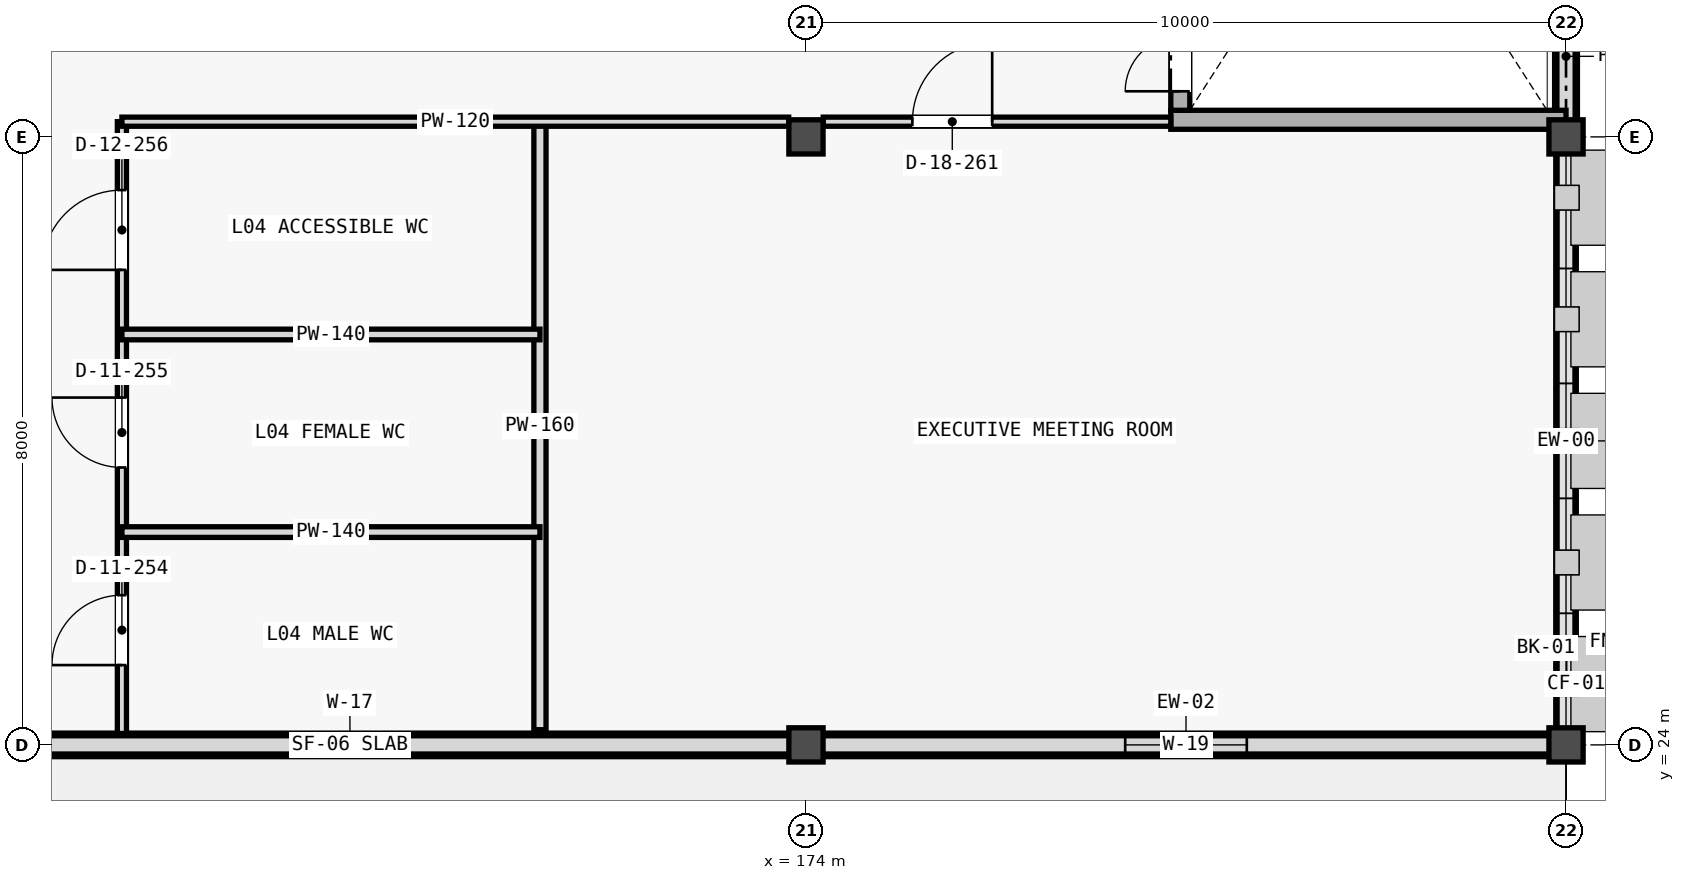
"""IFC4 building model, lengths in metres.
Left out: names, types, materials, properties, quantities, classifications, styles, units other than length and angle.
Written with IfcOpenShell. Run it as: python <this file> out.ifc"""

import sys

from ifc_helpers import new_model, si_unit, direction, frame, frame_2d, origin, origin_2d, place, context, subcontext, project, spatial, rectangle, extrude, element, fill, save


model = new_model("IFC4")
c1 = context("Model", 3, precision=1e-05, world=origin(), true_north=direction((0.0, 1.0)))
c2 = subcontext(c1, "Body", "Model", "MODEL_VIEW")
j1 = project(units=[si_unit("LENGTHUNIT", "METRE"), si_unit("PLANEANGLEUNIT", "RADIAN")], contexts=[c1])
p1 = place(None, origin())
s1 = spatial("IfcSite", under=j1, at=p1, CompositionType="ELEMENT")
p2 = place(p1, origin())
s2 = spatial("IfcBuilding", under=s1, at=p2, CompositionType="ELEMENT")
p3 = place(p2, frame((0.0, 0.0, 18.6)))
s3 = spatial("IfcBuildingStorey", under=s2, at=p3, CompositionType="ELEMENT", Elevation=18.6)
for number, where, z_axis, x_axis in (
    (1, (174.0, 24.0, 0.0), (0.0, 0.0, 1.0), (1.0, 0.0, 0.0)),
    (2, (184.0, 24.0, 0.0), (0.0, 0.0, 1.0), (1.0, 0.0, 0.0)),
    (3, (174.0, 32.0, 0.0), (0.0, 0.0, 1.0), (1.0, 0.0, 0.0)),
    (4, (184.0, 32.0, 0.0), (0.0, 0.0, 1.0), (1.0, 0.0, 0.0)),
):
    element("IfcColumn", number, at=place(p3, frame(where, z_axis=z_axis, x_axis=x_axis)), inside=s3, PredefinedType="COLUMN", context=c2, shape_type="SweptSolid", body=[
        extrude(rectangle(XDim=0.45, YDim=0.45, at=origin_2d()), origin(), (0.0, 0.0, 1.0), 3.985),
    ])
p4 = place(p3, frame((184.0, 24.221, 0.0), z_axis=(0.0, 0.0, 1.0), x_axis=(0.0, 1.0, 0.0)))
e5 = element("IfcWall", 5, at=p4, inside=s3, PredefinedType="STANDARD", context=c2, shape_type="SweptSolid", body=[
    extrude(rectangle(XDim=7.558, YDim=0.27, at=frame_2d((3.779, 0.0))), origin(), (0.0, 0.0, 1.0), 0.8),
])
p5 = place(p3, frame((184.0, 32.221, 0.0), z_axis=(0.0, 0.0, 1.0), x_axis=(0.0, 1.0, 0.0)))
e6 = element("IfcWall", 6, at=p5, inside=s3, PredefinedType="SHEAR", context=c2, shape_type="SweptSolid", body=[
    extrude(rectangle(XDim=7.558, YDim=0.3, at=frame_2d((3.779, 0.0))), origin(), (0.0, 0.0, 1.0), 3.985),
])
p6 = place(p3, frame((162.221, 24.0, 0.0), z_axis=(0.0, 0.0, 1.0), x_axis=(1.0, 0.0, 0.0)))
e7 = element("IfcWall", 7, at=p6, inside=s3, PredefinedType="STANDARD", context=c2, shape_type="SweptSolid", body=[
    extrude(rectangle(XDim=11.558, YDim=0.31, at=frame_2d((5.779, 0.0))), origin(), (0.0, 0.0, 1.0), 3.4),
])
p7 = place(p6, frame((5.029, 0.0, 0.95)))
e8 = element("IfcOpeningElement", 8, at=p7, cuts=e7, PredefinedType="OPENING", context=c2, shape_type="SweptSolid", body=[
    extrude(rectangle(XDim=1.5, YDim=1.75, at=frame_2d((0.75, 0.875))), frame((0.0, 0.165, 0.0), z_axis=(0.0, -1.0, 0.0), x_axis=(1.0, 0.0, 0.0)), (0.0, 0.0, 1.0), 0.33),
])
p8 = place(p3, frame((174.221, 24.0, 0.0), z_axis=(0.0, 0.0, 1.0), x_axis=(1.0, 0.0, 0.0)))
e9 = element("IfcWall", 9, at=p8, inside=s3, PredefinedType="STANDARD", context=c2, shape_type="SweptSolid", body=[
    extrude(rectangle(XDim=9.558, YDim=0.31, at=frame_2d((4.779, 0.0))), origin(), (0.0, 0.0, 1.0), 3.4),
])
p9 = place(p8, frame((3.979, 0.0, 0.95)))
e10 = element("IfcOpeningElement", 10, at=p9, cuts=e9, PredefinedType="OPENING", context=c2, shape_type="SweptSolid", body=[
    extrude(rectangle(XDim=1.6, YDim=1.45, at=frame_2d((0.8, 0.725))), frame((0.0, 0.165, 0.0), z_axis=(0.0, -1.0, 0.0), x_axis=(1.0, 0.0, 0.0)), (0.0, 0.0, 1.0), 0.33),
])
p10 = place(p3, frame((152.0, 24.0, 4.2), z_axis=(0.0, 0.0, 1.0), x_axis=(1.0, 0.0, 0.0)))
e11 = element("IfcWall", 11, at=p10, inside=s3, PredefinedType="PARAPET", context=c2, shape_type="SweptSolid", body=[
    extrude(rectangle(XDim=32.0, YDim=0.24, at=frame_2d((16.0, 0.0))), origin(), (0.0, 0.0, 1.0), 1.1),
])
p11 = place(p3, frame((184.0, 24.12, 4.2), z_axis=(0.0, 0.0, 1.0), x_axis=(0.0, 1.0, 0.0)))
e12 = element("IfcWall", 12, at=p11, inside=s3, PredefinedType="PARAPET", context=c2, shape_type="SweptSolid", body=[
    extrude(rectangle(XDim=55.76, YDim=0.24, at=frame_2d((27.88, 0.0))), origin(), (0.0, 0.0, 1.0), 1.1),
])
p12 = place(p3, frame((178.8, 32.225, 0.0), z_axis=(0.0, 0.0, 1.0), x_axis=(1.0, 0.0, 0.0)))
e13 = element("IfcWall", 13, at=p12, inside=s3, PredefinedType="SHEAR", context=c2, shape_type="SweptSolid", body=[
    extrude(rectangle(XDim=5.2, YDim=0.25, at=frame_2d((2.6, 0.0))), origin(), (0.0, 0.0, 1.0), 3.985),
])
p13 = place(p3, frame((178.925, 32.35, 0.0), z_axis=(0.0, 0.0, 1.0), x_axis=(0.0, 1.0, 0.0)))
e14 = element("IfcWall", 14, at=p13, inside=s3, PredefinedType="SHEAR", context=c2, shape_type="SweptSolid", body=[
    extrude(rectangle(XDim=7.3, YDim=0.25, at=frame_2d((3.65, 0.0))), origin(), (0.0, 0.0, 1.0), 3.985),
])
p14 = place(p13, frame((0.25, 0.0, 0.0)))
e15 = element("IfcOpeningElement", 15, at=p14, cuts=e14, PredefinedType="OPENING", context=c2, shape_type="SweptSolid", body=[
    extrude(rectangle(XDim=1.45, YDim=2.2, at=frame_2d((0.725, 1.1))), frame((0.0, 0.135, 0.0), z_axis=(0.0, -1.0, 0.0), x_axis=(1.0, 0.0, 0.0)), (0.0, 0.0, 1.0), 0.27),
])
p15 = place(p3, frame((165.0, 24.15, 0.0), z_axis=(0.0, 0.0, 1.0), x_axis=(0.0, 1.0, 0.0)))
e16 = element("IfcWall", 16, at=p15, inside=s3, PredefinedType="PARTITIONING", context=c2, shape_type="SweptSolid", body=[
    extrude(rectangle(XDim=8.05, YDim=0.12, at=frame_2d((4.025, 0.0))), origin(), (0.0, 0.0, 1.0), 3.515),
])
p16 = place(p15, frame((0.9, 0.0, 0.0)))
e17 = element("IfcOpeningElement", 17, at=p16, cuts=e16, PredefinedType="OPENING", context=c2, shape_type="SweptSolid", body=[
    extrude(rectangle(XDim=0.92, YDim=2.1, at=frame_2d((0.46, 1.05))), frame((0.0, 0.07, 0.0), z_axis=(0.0, -1.0, 0.0), x_axis=(1.0, 0.0, 0.0)), (0.0, 0.0, 1.0), 0.14),
])
p17 = place(p15, frame((3.5, 0.0, 0.0)))
e18 = element("IfcOpeningElement", 18, at=p17, cuts=e16, PredefinedType="OPENING", context=c2, shape_type="SweptSolid", body=[
    extrude(rectangle(XDim=0.92, YDim=2.1, at=frame_2d((0.46, 1.05))), frame((0.0, 0.07, 0.0), z_axis=(0.0, -1.0, 0.0), x_axis=(1.0, 0.0, 0.0)), (0.0, 0.0, 1.0), 0.14),
])
p18 = place(p15, frame((6.1, 0.0, 0.0)))
e19 = element("IfcOpeningElement", 19, at=p18, cuts=e16, PredefinedType="OPENING", context=c2, shape_type="SweptSolid", body=[
    extrude(rectangle(XDim=1.05, YDim=2.15, at=frame_2d((0.525, 1.075))), frame((0.0, 0.07, 0.0), z_axis=(0.0, -1.0, 0.0), x_axis=(1.0, 0.0, 0.0)), (0.0, 0.0, 1.0), 0.14),
])
p19 = place(p3, frame((170.5, 24.2, 0.0), z_axis=(0.0, 0.0, 1.0), x_axis=(0.0, 1.0, 0.0)))
e20 = element("IfcWall", 20, at=p19, inside=s3, PredefinedType="PARTITIONING", context=c2, shape_type="SweptSolid", body=[
    extrude(rectangle(XDim=8.0, YDim=0.16, at=frame_2d((4.0, 0.0))), origin(), (0.0, 0.0, 1.0), 3.515),
])
for number, where, z_axis, x_axis in (
    (21, (165.0, 26.8, 0.0), (0.0, 0.0, 1.0), (1.0, 0.0, 0.0)),
    (22, (165.0, 29.4, 0.0), (0.0, 0.0, 1.0), (1.0, 0.0, 0.0)),
):
    element("IfcWall", number, at=place(p3, frame(where, z_axis=z_axis, x_axis=x_axis)), inside=s3, PredefinedType="PLUMBINGWALL", context=c2, shape_type="SweptSolid", body=[
        extrude(rectangle(XDim=5.5, YDim=0.14, at=frame_2d((2.75, 0.0))), origin(), (0.0, 0.0, 1.0), 3.725),
    ])
p20 = place(p3, frame((165.0, 32.2, 0.0), z_axis=(0.0, 0.0, 1.0), x_axis=(1.0, 0.0, 0.0)))
e23 = element("IfcWall", 23, at=p20, inside=s3, PredefinedType="PARTITIONING", context=c2, shape_type="SweptSolid", body=[
    extrude(rectangle(XDim=8.773, YDim=0.12, at=frame_2d((4.386, 0.0))), origin(), (0.0, 0.0, 1.0), 3.515),
])
p21 = place(p3, frame((174.227, 32.2, 0.0), z_axis=(0.0, 0.0, 1.0), x_axis=(1.0, 0.0, 0.0)))
e24 = element("IfcWall", 24, at=p21, inside=s3, PredefinedType="PARTITIONING", context=c2, shape_type="SweptSolid", body=[
    extrude(rectangle(XDim=4.573, YDim=0.12, at=frame_2d((2.287, 0.0))), origin(), (0.0, 0.0, 1.0), 3.515),
])
p22 = place(p21, frame((1.173, 0.0, 0.0)))
e25 = element("IfcOpeningElement", 25, at=p22, cuts=e24, PredefinedType="OPENING", context=c2, shape_type="SweptSolid", body=[
    extrude(rectangle(XDim=1.05, YDim=2.2, at=frame_2d((0.525, 1.1))), frame((0.0, 0.07, 0.0), z_axis=(0.0, -1.0, 0.0), x_axis=(1.0, 0.0, 0.0)), (0.0, 0.0, 1.0), 0.14),
])
p23 = place(p7, origin())
e26 = element("IfcWindow", 26, at=p23, inside=s3, PartitioningType="SINGLE_PANEL", PredefinedType="WINDOW", context=c2, shape_type="SweptSolid", body=[
    extrude(rectangle(XDim=1.5, YDim=1.75, at=frame_2d((0.75, 0.875))), frame((0.0, 0.03, 0.0), z_axis=(0.0, -1.0, 0.0), x_axis=(1.0, 0.0, 0.0)), (0.0, 0.0, 1.0), 0.06),
])
fill(e8, e26)
p24 = place(p9, origin())
e27 = element("IfcWindow", 27, at=p24, inside=s3, PartitioningType="SINGLE_PANEL", PredefinedType="WINDOW", context=c2, shape_type="SweptSolid", body=[
    extrude(rectangle(XDim=1.6, YDim=1.45, at=frame_2d((0.8, 0.725))), frame((0.0, 0.03, 0.0), z_axis=(0.0, -1.0, 0.0), x_axis=(1.0, 0.0, 0.0)), (0.0, 0.0, 1.0), 0.06),
])
fill(e10, e27)
p25 = place(p14, origin())
e28 = element("IfcDoor", 28, at=p25, inside=s3, OperationType="DOUBLE_DOOR_SINGLE_SWING", PredefinedType="DOOR", context=c2, shape_type="SweptSolid", body=[
    extrude(rectangle(XDim=1.45, YDim=2.2, at=frame_2d((0.725, 1.1))), frame((0.0, 0.025, 0.0), z_axis=(0.0, -1.0, 0.0), x_axis=(1.0, 0.0, 0.0)), (0.0, 0.0, 1.0), 0.05),
])
fill(e15, e28)
p26 = place(p16, origin())
e29 = element("IfcDoor", 29, at=p26, inside=s3, OperationType="SINGLE_SWING_LEFT", PredefinedType="DOOR", context=c2, shape_type="SweptSolid", body=[
    extrude(rectangle(XDim=0.92, YDim=2.1, at=frame_2d((0.46, 1.05))), frame((0.0, 0.025, 0.0), z_axis=(0.0, -1.0, 0.0), x_axis=(1.0, 0.0, 0.0)), (0.0, 0.0, 1.0), 0.05),
])
fill(e17, e29)
p27 = place(p17, origin())
e30 = element("IfcDoor", 30, at=p27, inside=s3, OperationType="SINGLE_SWING_RIGHT", PredefinedType="DOOR", context=c2, shape_type="SweptSolid", body=[
    extrude(rectangle(XDim=0.92, YDim=2.1, at=frame_2d((0.46, 1.05))), frame((0.0, 0.025, 0.0), z_axis=(0.0, -1.0, 0.0), x_axis=(1.0, 0.0, 0.0)), (0.0, 0.0, 1.0), 0.05),
])
fill(e18, e30)
p28 = place(p18, origin())
e31 = element("IfcDoor", 31, at=p28, inside=s3, OperationType="SINGLE_SWING_LEFT", PredefinedType="DOOR", context=c2, shape_type="SweptSolid", body=[
    extrude(rectangle(XDim=1.05, YDim=2.15, at=frame_2d((0.525, 1.075))), frame((0.0, 0.025, 0.0), z_axis=(0.0, -1.0, 0.0), x_axis=(1.0, 0.0, 0.0)), (0.0, 0.0, 1.0), 0.05),
])
fill(e19, e31)
p29 = place(p22, origin())
e32 = element("IfcDoor", 32, at=p29, inside=s3, OperationType="SINGLE_SWING_RIGHT", PredefinedType="DOOR", context=c2, shape_type="SweptSolid", body=[
    extrude(rectangle(XDim=1.05, YDim=2.2, at=frame_2d((0.525, 1.1))), frame((0.0, 0.025, 0.0), z_axis=(0.0, -1.0, 0.0), x_axis=(1.0, 0.0, 0.0)), (0.0, 0.0, 1.0), 0.05),
])
fill(e25, e32)
save(model, sys.argv[1])
